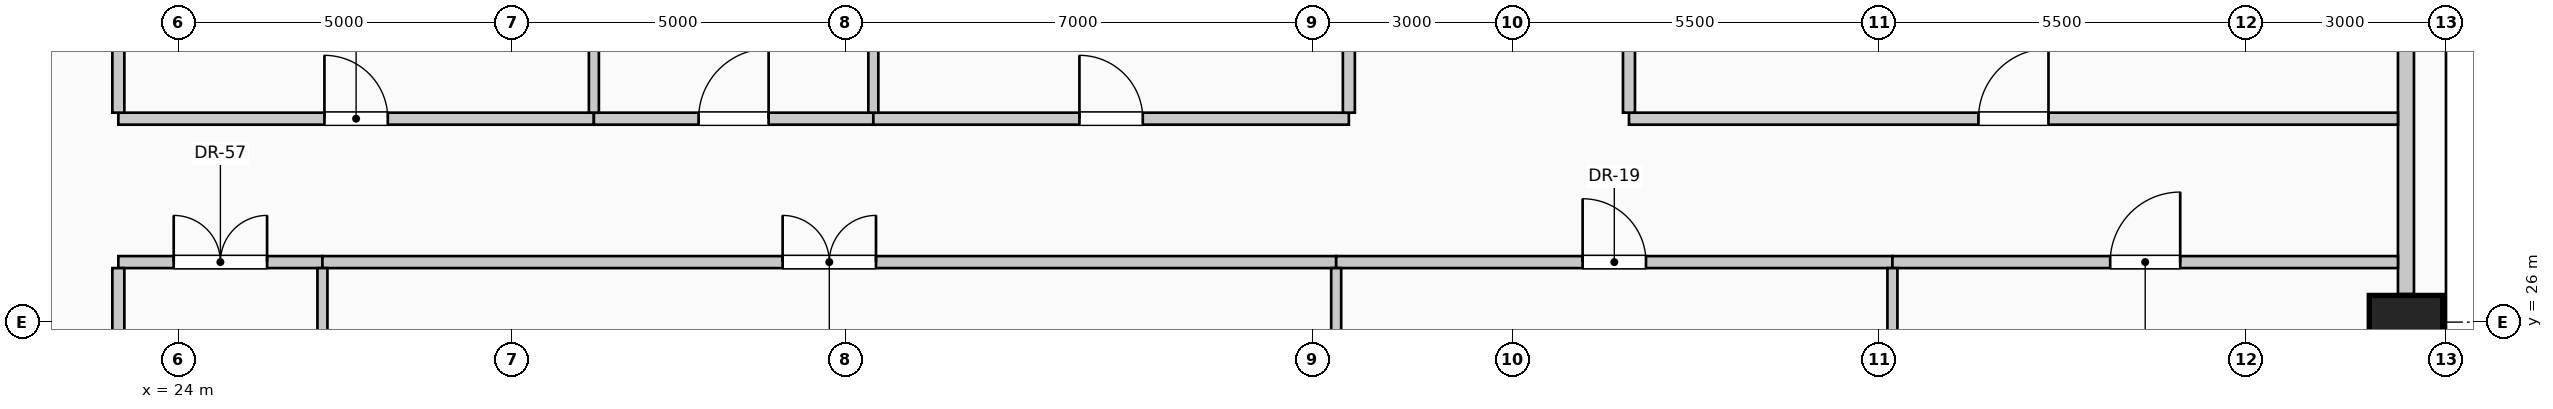
"""IFC4 building model, lengths in metres.
Left out: names, types, materials, properties, quantities, classifications, styles, units other than length and angle.
Written with IfcOpenShell. Run it as: python <this file> out.ifc"""

import sys

from ifc_helpers import new_model, si_unit, direction, frame, frame_2d, origin, origin_2d, place, context, subcontext, project, spatial, rectangle, extrude, element, fill, save


model = new_model("IFC4")
c1 = context("Model", 3, precision=1e-05, world=origin(), true_north=direction((0.0, 1.0)))
c2 = subcontext(c1, "Body", "Model", "MODEL_VIEW")
j1 = project(units=[si_unit("LENGTHUNIT", "METRE"), si_unit("PLANEANGLEUNIT", "RADIAN")], contexts=[c1])
p1 = place(None, origin())
s1 = spatial("IfcSite", under=j1, at=p1, CompositionType="ELEMENT")
p2 = place(p1, origin())
s2 = spatial("IfcBuilding", under=s1, at=p2, CompositionType="ELEMENT")
p3 = place(p2, frame((0.0, 0.0, 170.6)))
s3 = spatial("IfcBuildingStorey", under=s2, at=p3, CompositionType="ELEMENT", Elevation=170.6)
p4 = place(p3, frame((57.4, 26.0, 0.0), z_axis=(0.0, 0.0, 1.0), x_axis=(0.0, 1.0, 0.0)))
e1 = element("IfcColumn", 1, at=p4, inside=s3, PredefinedType="COLUMN", context=c2, shape_type="SweptSolid", body=[
    extrude(rectangle(XDim=0.8, YDim=1.1, at=origin_2d()), origin(), (0.0, 0.0, 1.0), 4.0),
])
p5 = place(p3, frame((57.4, 33.58, 0.0), z_axis=(0.0, 0.0, 1.0), x_axis=(0.0, -1.0, 0.0)))
e2 = element("IfcWall", 2, at=p5, inside=s3, PredefinedType="SOLIDWALL", context=c2, shape_type="SweptSolid", body=[
    extrude(rectangle(XDim=7.16, YDim=0.24, at=frame_2d((3.58, 0.0))), origin(), (0.0, 0.0, 1.0), 2.975),
])
p6 = place(p3, frame((23.1, 26.9, 0.0), z_axis=(0.0, 0.0, 1.0), x_axis=(1.0, 0.0, 0.0)))
e3 = element("IfcWall", 3, at=p6, inside=s3, PredefinedType="PARTITIONING", context=c2, shape_type="SweptSolid", body=[
    extrude(rectangle(XDim=3.06, YDim=0.18, at=frame_2d((1.53, 0.0))), origin(), (0.0, 0.0, 1.0), 3.725),
])
p7 = place(p6, frame((0.83, 0.0, 0.0)))
e4 = element("IfcOpeningElement", 4, at=p7, cuts=e3, PredefinedType="OPENING", context=c2, shape_type="SweptSolid", body=[
    extrude(rectangle(XDim=1.4, YDim=2.2, at=frame_2d((0.7, 1.1))), frame((0.0, 0.1, 0.0), z_axis=(0.0, -1.0, 0.0), x_axis=(1.0, 0.0, 0.0)), (0.0, 0.0, 1.0), 0.2),
])
p8 = place(p3, frame((26.16, 26.9, 0.0), z_axis=(0.0, 0.0, 1.0), x_axis=(1.0, 0.0, 0.0)))
e5 = element("IfcWall", 5, at=p8, inside=s3, PredefinedType="PARTITIONING", context=c2, shape_type="SweptSolid", body=[
    extrude(rectangle(XDim=15.2, YDim=0.18, at=frame_2d((7.6, 0.0))), origin(), (0.0, 0.0, 1.0), 3.725),
])
p9 = place(p8, frame((6.9, 0.0, 0.0)))
e6 = element("IfcOpeningElement", 6, at=p9, cuts=e5, PredefinedType="OPENING", context=c2, shape_type="SweptSolid", body=[
    extrude(rectangle(XDim=1.4, YDim=2.2, at=frame_2d((0.7, 1.1))), frame((0.0, 0.1, 0.0), z_axis=(0.0, -1.0, 0.0), x_axis=(1.0, 0.0, 0.0)), (0.0, 0.0, 1.0), 0.2),
])
p10 = place(p3, frame((41.36, 26.9, 0.0), z_axis=(0.0, 0.0, 1.0), x_axis=(1.0, 0.0, 0.0)))
e7 = element("IfcWall", 7, at=p10, inside=s3, PredefinedType="PARTITIONING", context=c2, shape_type="SweptSolid", body=[
    extrude(rectangle(XDim=8.34, YDim=0.18, at=frame_2d((4.17, 0.0))), origin(), (0.0, 0.0, 1.0), 3.725),
])
p11 = place(p10, frame((3.695, 0.0, 0.0)))
e8 = element("IfcOpeningElement", 8, at=p11, cuts=e7, PredefinedType="OPENING", context=c2, shape_type="SweptSolid", body=[
    extrude(rectangle(XDim=0.95, YDim=2.15, at=frame_2d((0.475, 1.075))), frame((0.0, 0.1, 0.0), z_axis=(0.0, -1.0, 0.0), x_axis=(1.0, 0.0, 0.0)), (0.0, 0.0, 1.0), 0.2),
])
p12 = place(p3, frame((49.7, 26.9, 0.0), z_axis=(0.0, 0.0, 1.0), x_axis=(1.0, 0.0, 0.0)))
e9 = element("IfcWall", 9, at=p12, inside=s3, PredefinedType="PARTITIONING", context=c2, shape_type="SweptSolid", body=[
    extrude(rectangle(XDim=7.58, YDim=0.18, at=frame_2d((3.79, 0.0))), origin(), (0.0, 0.0, 1.0), 3.725),
])
p13 = place(p12, frame((3.265, 0.0, 0.0)))
e10 = element("IfcOpeningElement", 10, at=p13, cuts=e9, PredefinedType="OPENING", context=c2, shape_type="SweptSolid", body=[
    extrude(rectangle(XDim=1.05, YDim=2.15, at=frame_2d((0.525, 1.075))), frame((0.0, 0.1, 0.0), z_axis=(0.0, -1.0, 0.0), x_axis=(1.0, 0.0, 0.0)), (0.0, 0.0, 1.0), 0.2),
])
p14 = place(p3, frame((23.1, 29.05, 0.0), z_axis=(0.0, 0.0, 1.0), x_axis=(1.0, 0.0, 0.0)))
e11 = element("IfcWall", 11, at=p14, inside=s3, PredefinedType="PARTITIONING", context=c2, shape_type="SweptSolid", body=[
    extrude(rectangle(XDim=7.13, YDim=0.18, at=frame_2d((3.565, 0.0))), origin(), (0.0, 0.0, 1.0), 3.725),
])
p15 = place(p14, frame((3.09, 0.0, 0.0)))
e12 = element("IfcOpeningElement", 12, at=p15, cuts=e11, PredefinedType="OPENING", context=c2, shape_type="SweptSolid", body=[
    extrude(rectangle(XDim=0.95, YDim=2.15, at=frame_2d((0.475, 1.075))), frame((0.0, 0.1, 0.0), z_axis=(0.0, -1.0, 0.0), x_axis=(1.0, 0.0, 0.0)), (0.0, 0.0, 1.0), 0.2),
])
p16 = place(p3, frame((30.23, 29.05, 0.0), z_axis=(0.0, 0.0, 1.0), x_axis=(1.0, 0.0, 0.0)))
e13 = element("IfcWall", 13, at=p16, inside=s3, PredefinedType="PARTITIONING", context=c2, shape_type="SweptSolid", body=[
    extrude(rectangle(XDim=4.19, YDim=0.18, at=frame_2d((2.095, 0.0))), origin(), (0.0, 0.0, 1.0), 3.725),
])
p17 = place(p16, frame((1.57, 0.0, 0.0)))
e14 = element("IfcOpeningElement", 14, at=p17, cuts=e13, PredefinedType="OPENING", context=c2, shape_type="SweptSolid", body=[
    extrude(rectangle(XDim=1.05, YDim=2.15, at=frame_2d((0.525, 1.075))), frame((0.0, 0.1, 0.0), z_axis=(0.0, -1.0, 0.0), x_axis=(1.0, 0.0, 0.0)), (0.0, 0.0, 1.0), 0.2),
])
p18 = place(p3, frame((34.42, 29.05, 0.0), z_axis=(0.0, 0.0, 1.0), x_axis=(1.0, 0.0, 0.0)))
e15 = element("IfcWall", 15, at=p18, inside=s3, PredefinedType="PARTITIONING", context=c2, shape_type="SweptSolid", body=[
    extrude(rectangle(XDim=7.13, YDim=0.18, at=frame_2d((3.565, 0.0))), origin(), (0.0, 0.0, 1.0), 3.725),
])
p19 = place(p18, frame((3.09, 0.0, 0.0)))
e16 = element("IfcOpeningElement", 16, at=p19, cuts=e15, PredefinedType="OPENING", context=c2, shape_type="SweptSolid", body=[
    extrude(rectangle(XDim=0.95, YDim=2.15, at=frame_2d((0.475, 1.075))), frame((0.0, 0.1, 0.0), z_axis=(0.0, -1.0, 0.0), x_axis=(1.0, 0.0, 0.0)), (0.0, 0.0, 1.0), 0.2),
])
p20 = place(p3, frame((45.75, 29.05, 0.0), z_axis=(0.0, 0.0, 1.0), x_axis=(1.0, 0.0, 0.0)))
e17 = element("IfcWall", 17, at=p20, inside=s3, PredefinedType="PARTITIONING", context=c2, shape_type="SweptSolid", body=[
    extrude(rectangle(XDim=11.53, YDim=0.18, at=frame_2d((5.765, 0.0))), origin(), (0.0, 0.0, 1.0), 3.725),
])
p21 = place(p20, frame((5.24, 0.0, 0.0)))
e18 = element("IfcOpeningElement", 18, at=p21, cuts=e17, PredefinedType="OPENING", context=c2, shape_type="SweptSolid", body=[
    extrude(rectangle(XDim=1.05, YDim=2.15, at=frame_2d((0.525, 1.075))), frame((0.0, 0.1, 0.0), z_axis=(0.0, -1.0, 0.0), x_axis=(1.0, 0.0, 0.0)), (0.0, 0.0, 1.0), 0.2),
])
p22 = place(p3, frame((23.1, 17.3, 0.0), z_axis=(0.0, 0.0, 1.0), x_axis=(0.0, 1.0, 0.0)))
e19 = element("IfcWall", 19, at=p22, inside=s3, PredefinedType="PARTITIONING", context=c2, shape_type="SweptSolid", body=[
    extrude(rectangle(XDim=9.51, YDim=0.18, at=frame_2d((4.755, 0.0))), origin(), (0.0, 0.0, 1.0), 3.725),
])
p23 = place(p3, frame((23.1, 29.14, 0.0), z_axis=(0.0, 0.0, 1.0), x_axis=(0.0, 1.0, 0.0)))
e20 = element("IfcWall", 20, at=p23, inside=s3, PredefinedType="PARTITIONING", context=c2, shape_type="SweptSolid", body=[
    extrude(rectangle(XDim=3.12, YDim=0.18, at=frame_2d((1.56, 0.0))), origin(), (0.0, 0.0, 1.0), 3.725),
])
p24 = place(p3, frame((26.16, 0.72, 0.0), z_axis=(0.0, 0.0, 1.0), x_axis=(0.0, 1.0, 0.0)))
e21 = element("IfcWall", 21, at=p24, inside=s3, PredefinedType="PARTITIONING", context=c2, shape_type="SweptSolid", body=[
    extrude(rectangle(XDim=26.09, YDim=0.15, at=frame_2d((13.045, 0.0))), origin(), (0.0, 0.0, 1.0), 3.725),
])
p25 = place(p3, frame((30.23, 29.14, 0.0), z_axis=(0.0, 0.0, 1.0), x_axis=(0.0, 1.0, 0.0)))
e22 = element("IfcWall", 22, at=p25, inside=s3, PredefinedType="PARTITIONING", context=c2, shape_type="SweptSolid", body=[
    extrude(rectangle(XDim=16.14, YDim=0.15, at=frame_2d((8.07, 0.0))), origin(), (0.0, 0.0, 1.0), 3.725),
])
p26 = place(p3, frame((34.42, 29.14, 0.0), z_axis=(0.0, 0.0, 1.0), x_axis=(0.0, 1.0, 0.0)))
e23 = element("IfcWall", 23, at=p26, inside=s3, PredefinedType="PARTITIONING", context=c2, shape_type="SweptSolid", body=[
    extrude(rectangle(XDim=15.61, YDim=0.15, at=frame_2d((7.805, 0.0))), origin(), (0.0, 0.0, 1.0), 3.725),
])
p27 = place(p3, frame((41.36, 18.425, 0.0), z_axis=(0.0, 0.0, 1.0), x_axis=(0.0, 1.0, 0.0)))
e24 = element("IfcWall", 24, at=p27, inside=s3, PredefinedType="PARTITIONING", context=c2, shape_type="SweptSolid", body=[
    extrude(rectangle(XDim=8.385, YDim=0.15, at=frame_2d((4.192, 0.0))), origin(), (0.0, 0.0, 1.0), 3.12),
])
p28 = place(p3, frame((41.55, 29.14, 0.0), z_axis=(0.0, 0.0, 1.0), x_axis=(0.0, 1.0, 0.0)))
e25 = element("IfcWall", 25, at=p28, inside=s3, PredefinedType="PARTITIONING", context=c2, shape_type="SweptSolid", body=[
    extrude(rectangle(XDim=3.21, YDim=0.18, at=frame_2d((1.605, 0.0))), origin(), (0.0, 0.0, 1.0), 3.12),
])
p29 = place(p3, frame((45.75, 29.14, 0.0), z_axis=(0.0, 0.0, 1.0), x_axis=(0.0, 1.0, 0.0)))
e26 = element("IfcWall", 26, at=p29, inside=s3, PredefinedType="PARTITIONING", context=c2, shape_type="SweptSolid", body=[
    extrude(rectangle(XDim=3.135, YDim=0.18, at=frame_2d((1.567, 0.0))), origin(), (0.0, 0.0, 1.0), 3.725),
])
p30 = place(p3, frame((49.7, 1.15, 0.0), z_axis=(0.0, 0.0, 1.0), x_axis=(0.0, 1.0, 0.0)))
e27 = element("IfcWall", 27, at=p30, inside=s3, PredefinedType="PARTITIONING", context=c2, shape_type="SweptSolid", body=[
    extrude(rectangle(XDim=25.66, YDim=0.15, at=frame_2d((12.83, 0.0))), origin(), (0.0, 0.0, 1.0), 3.725),
])
p31 = place(p7, origin())
e28 = element("IfcDoor", 28, at=p31, inside=s3, OperationType="DOUBLE_DOOR_SINGLE_SWING", PredefinedType="DOOR", context=c2, shape_type="SweptSolid", body=[
    extrude(rectangle(XDim=1.4, YDim=2.2, at=frame_2d((0.7, 1.1))), frame((0.0, 0.025, 0.0), z_axis=(0.0, -1.0, 0.0), x_axis=(1.0, 0.0, 0.0)), (0.0, 0.0, 1.0), 0.05),
])
fill(e4, e28)
p32 = place(p9, origin())
e29 = element("IfcDoor", 29, at=p32, inside=s3, OperationType="DOUBLE_DOOR_SINGLE_SWING", PredefinedType="DOOR", context=c2, shape_type="SweptSolid", body=[
    extrude(rectangle(XDim=1.4, YDim=2.2, at=frame_2d((0.7, 1.1))), frame((0.0, 0.025, 0.0), z_axis=(0.0, -1.0, 0.0), x_axis=(1.0, 0.0, 0.0)), (0.0, 0.0, 1.0), 0.05),
])
fill(e6, e29)
p33 = place(p11, origin())
e30 = element("IfcDoor", 30, at=p33, inside=s3, OperationType="SINGLE_SWING_LEFT", PredefinedType="DOOR", context=c2, shape_type="SweptSolid", body=[
    extrude(rectangle(XDim=0.95, YDim=2.15, at=frame_2d((0.475, 1.075))), frame((0.0, 0.025, 0.0), z_axis=(0.0, -1.0, 0.0), x_axis=(1.0, 0.0, 0.0)), (0.0, 0.0, 1.0), 0.05),
])
fill(e8, e30)
p34 = place(p13, origin())
e31 = element("IfcDoor", 31, at=p34, inside=s3, OperationType="SINGLE_SWING_RIGHT", PredefinedType="DOOR", context=c2, shape_type="SweptSolid", body=[
    extrude(rectangle(XDim=1.05, YDim=2.15, at=frame_2d((0.525, 1.075))), frame((0.0, 0.025, 0.0), z_axis=(0.0, -1.0, 0.0), x_axis=(1.0, 0.0, 0.0)), (0.0, 0.0, 1.0), 0.05),
])
fill(e10, e31)
p35 = place(p15, origin())
e32 = element("IfcDoor", 32, at=p35, inside=s3, OperationType="SINGLE_SWING_LEFT", PredefinedType="DOOR", context=c2, shape_type="SweptSolid", body=[
    extrude(rectangle(XDim=0.95, YDim=2.15, at=frame_2d((0.475, 1.075))), frame((0.0, 0.025, 0.0), z_axis=(0.0, -1.0, 0.0), x_axis=(1.0, 0.0, 0.0)), (0.0, 0.0, 1.0), 0.05),
])
fill(e12, e32)
p36 = place(p17, origin())
e33 = element("IfcDoor", 33, at=p36, inside=s3, OperationType="SINGLE_SWING_RIGHT", PredefinedType="DOOR", context=c2, shape_type="SweptSolid", body=[
    extrude(rectangle(XDim=1.05, YDim=2.15, at=frame_2d((0.525, 1.075))), frame((0.0, 0.025, 0.0), z_axis=(0.0, -1.0, 0.0), x_axis=(1.0, 0.0, 0.0)), (0.0, 0.0, 1.0), 0.05),
])
fill(e14, e33)
p37 = place(p19, origin())
e34 = element("IfcDoor", 34, at=p37, inside=s3, OperationType="SINGLE_SWING_LEFT", PredefinedType="DOOR", context=c2, shape_type="SweptSolid", body=[
    extrude(rectangle(XDim=0.95, YDim=2.15, at=frame_2d((0.475, 1.075))), frame((0.0, 0.025, 0.0), z_axis=(0.0, -1.0, 0.0), x_axis=(1.0, 0.0, 0.0)), (0.0, 0.0, 1.0), 0.05),
])
fill(e16, e34)
p38 = place(p21, origin())
e35 = element("IfcDoor", 35, at=p38, inside=s3, OperationType="SINGLE_SWING_RIGHT", PredefinedType="DOOR", context=c2, shape_type="SweptSolid", body=[
    extrude(rectangle(XDim=1.05, YDim=2.15, at=frame_2d((0.525, 1.075))), frame((0.0, 0.025, 0.0), z_axis=(0.0, -1.0, 0.0), x_axis=(1.0, 0.0, 0.0)), (0.0, 0.0, 1.0), 0.05),
])
fill(e18, e35)
save(model, sys.argv[1])
